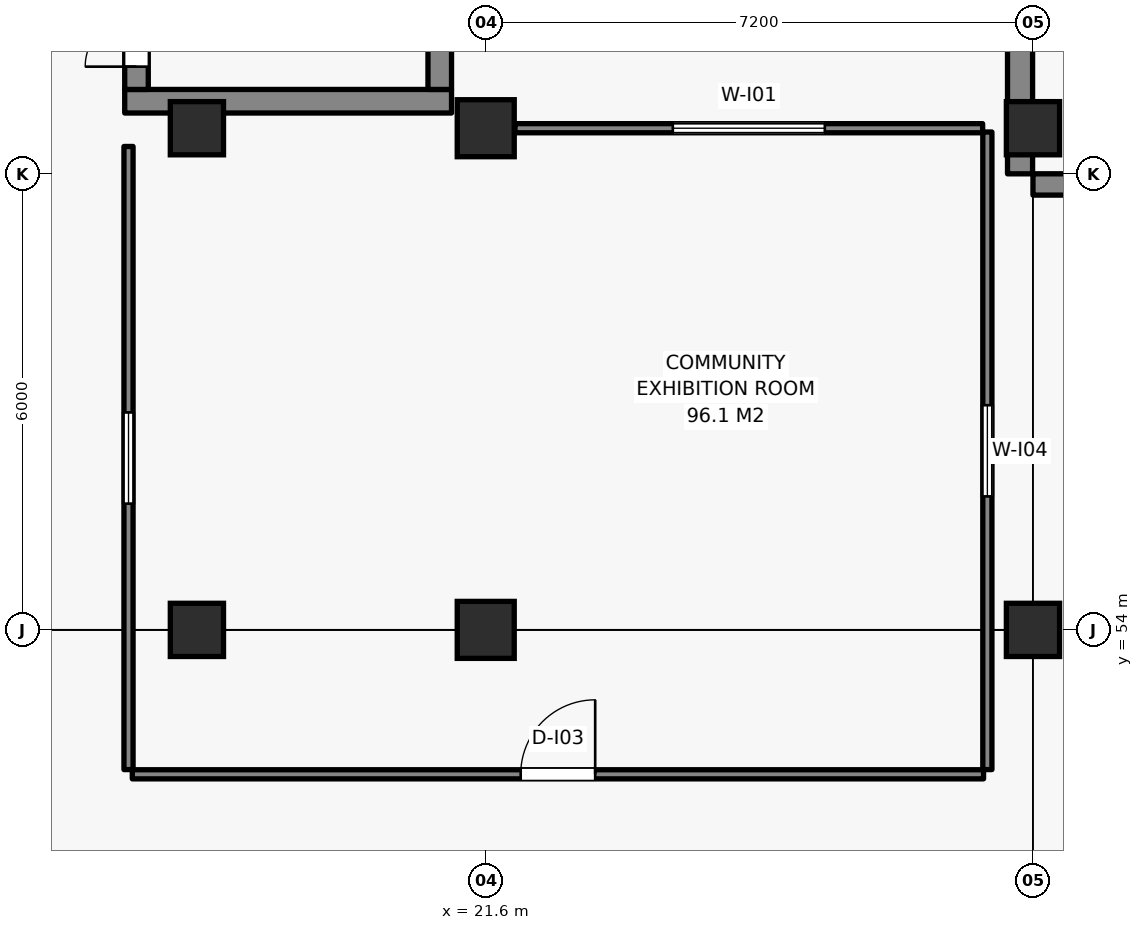
"""IFC4 building model, lengths in metres.
Left out: names, types, materials, properties, quantities, classifications, styles, units other than length and angle.
Written with IfcOpenShell. Run it as: python <this file> out.ifc"""

import sys

from ifc_helpers import new_model, si_unit, direction, frame, frame_2d, origin, origin_2d, place, context, subcontext, project, spatial, rectangle, extrude, element, fill, save


model = new_model("IFC4")
c1 = context("Model", 3, precision=1e-05, world=origin(), true_north=direction((0.0, 1.0)))
c2 = subcontext(c1, "Body", "Model", "MODEL_VIEW")
j1 = project(units=[si_unit("LENGTHUNIT", "METRE"), si_unit("PLANEANGLEUNIT", "RADIAN")], contexts=[c1])
p1 = place(None, origin())
s1 = spatial("IfcSite", under=j1, at=p1, CompositionType="ELEMENT")
p2 = place(p1, origin())
s2 = spatial("IfcBuilding", under=s1, at=p2, CompositionType="ELEMENT")
p3 = place(p2, origin())
s3 = spatial("IfcBuildingStorey", under=s2, at=p3, CompositionType="ELEMENT", Elevation=0.0)
p4 = place(p3, frame((16.85, 60.955, -0.4), z_axis=(0.0, 0.0, 1.0), x_axis=(1.0, 0.0, 0.0)))
e1 = element("IfcWall", 1, at=p4, inside=s3, PredefinedType="SHEAR", context=c2, shape_type="SweptSolid", body=[
    extrude(rectangle(XDim=4.3, YDim=0.31, at=frame_2d((2.15, 0.0))), origin(), (0.0, 0.0, 1.0), 6.15),
])
p5 = place(p3, frame((17.005, 61.11, -0.4), z_axis=(0.0, 0.0, 1.0), x_axis=(0.0, 1.0, 0.0)))
e2 = element("IfcWall", 2, at=p5, inside=s3, PredefinedType="SHEAR", context=c2, shape_type="SweptSolid", body=[
    extrude(rectangle(XDim=9.58, YDim=0.31, at=frame_2d((4.79, 0.0))), origin(), (0.0, 0.0, 1.0), 6.15),
])
p6 = place(p5, frame((0.3, 0.0, 0.4)))
e3 = element("IfcOpeningElement", 3, at=p6, cuts=e2, PredefinedType="OPENING", context=c2, shape_type="SweptSolid", body=[
    extrude(rectangle(XDim=1.35, YDim=2.15, at=frame_2d((0.675, 1.075))), frame((0.0, 0.165, 0.0), z_axis=(0.0, -1.0, 0.0), x_axis=(1.0, 0.0, 0.0)), (0.0, 0.0, 1.0), 0.33),
])
p7 = place(p3, frame((20.995, 61.11, -0.4), z_axis=(0.0, 0.0, 1.0), x_axis=(0.0, 1.0, 0.0)))
e4 = element("IfcWall", 4, at=p7, inside=s3, PredefinedType="SHEAR", context=c2, shape_type="SweptSolid", body=[
    extrude(rectangle(XDim=9.58, YDim=0.31, at=frame_2d((4.79, 0.0))), origin(), (0.0, 0.0, 1.0), 6.15),
])
for number, where, z_axis, x_axis in (
    (5, (17.8, 54.0, 0.0), (0.0, 0.0, 1.0), (1.0, 0.0, 0.0)),
    (6, (17.8, 60.6, 0.0), (0.0, 0.0, 1.0), (1.0, 0.0, 0.0)),
):
    element("IfcColumn", number, at=place(p3, frame(where, z_axis=z_axis, x_axis=x_axis)), inside=s3, PredefinedType="COLUMN", context=c2, shape_type="SweptSolid", body=[
        extrude(rectangle(XDim=0.7, YDim=0.7, at=origin_2d()), origin(), (0.0, 0.0, 1.0), 6.0),
    ])
for number, where, z_axis, x_axis in (
    (7, (21.6, 54.0, 0.0), (0.0, 0.0, 1.0), (1.0, 0.0, 0.0)),
    (8, (21.6, 60.6, 0.0), (0.0, 0.0, 1.0), (1.0, 0.0, 0.0)),
):
    element("IfcColumn", number, at=place(p3, frame(where, z_axis=z_axis, x_axis=x_axis)), inside=s3, PredefinedType="COLUMN", context=c2, shape_type="SweptSolid", body=[
        extrude(rectangle(XDim=0.75, YDim=0.75, at=origin_2d()), origin(), (0.0, 0.0, 1.0), 6.0),
    ])
for number, where, z_axis, x_axis in (
    (9, (28.8, 54.0, 0.0), (0.0, 0.0, 1.0), (1.0, 0.0, 0.0)),
    (10, (28.8, 60.6, 0.0), (0.0, 0.0, 1.0), (1.0, 0.0, 0.0)),
):
    element("IfcColumn", number, at=place(p3, frame(where, z_axis=z_axis, x_axis=x_axis)), inside=s3, PredefinedType="COLUMN", context=c2, shape_type="SweptSolid", body=[
        extrude(rectangle(XDim=0.7, YDim=0.7, at=origin_2d()), origin(), (0.0, 0.0, 1.0), 6.0),
    ])
p8 = place(p3, frame((28.63, 60.0, 0.0), z_axis=(0.0, 0.0, 1.0), x_axis=(0.0, 1.0, 0.0)))
e11 = element("IfcWall", 11, at=p8, inside=s3, PredefinedType="SOLIDWALL", context=c2, shape_type="SweptSolid", body=[
    extrude(rectangle(XDim=23.66, YDim=0.33, at=frame_2d((11.83, 0.0))), origin(), (0.0, 0.0, 1.0), 5.345),
])
p9 = place(p8, frame((7.518, 0.0, 0.0)))
e12 = element("IfcOpeningElement", 12, at=p9, cuts=e11, PredefinedType="OPENING", context=c2, shape_type="SweptSolid", body=[
    extrude(rectangle(XDim=2.0, YDim=2.4, at=frame_2d((1.0, 1.2))), frame((0.0, 0.175, 0.0), z_axis=(0.0, -1.0, 0.0), x_axis=(1.0, 0.0, 0.0)), (0.0, 0.0, 1.0), 0.35),
])
p10 = place(p8, frame((16.98, 0.0, 0.0)))
e13 = element("IfcOpeningElement", 13, at=p10, cuts=e11, PredefinedType="OPENING", context=c2, shape_type="SweptSolid", body=[
    extrude(rectangle(XDim=1.15, YDim=2.25, at=frame_2d((0.575, 1.125))), frame((0.0, 0.175, 0.0), z_axis=(0.0, -1.0, 0.0), x_axis=(1.0, 0.0, 0.0)), (0.0, 0.0, 1.0), 0.35),
])
p11 = place(p8, frame((20.788, 0.0, 0.82)))
e14 = element("IfcOpeningElement", 14, at=p11, cuts=e11, PredefinedType="OPENING", context=c2, shape_type="SweptSolid", body=[
    extrude(rectangle(XDim=1.8, YDim=2.35, at=frame_2d((0.9, 1.175))), frame((0.0, 0.175, 0.0), z_axis=(0.0, -1.0, 0.0), x_axis=(1.0, 0.0, 0.0)), (0.0, 0.0, 1.0), 0.35),
])
p12 = place(p3, frame((39.2, 59.86, 0.0), z_axis=(0.0, 0.0, 1.0), x_axis=(-1.0, 0.0, 0.0)))
e15 = element("IfcWall", 15, at=p12, inside=s3, PredefinedType="SOLIDWALL", context=c2, shape_type="SweptSolid", body=[
    extrude(rectangle(XDim=10.4, YDim=0.28, at=frame_2d((5.2, 0.0))), origin(), (0.0, 0.0, 1.0), 5.345),
])
p13 = place(p12, frame((6.925, 0.0, 0.85)))
e16 = element("IfcOpeningElement", 16, at=p13, cuts=e15, PredefinedType="OPENING", context=c2, shape_type="SweptSolid", body=[
    extrude(rectangle(XDim=1.75, YDim=2.15, at=frame_2d((0.875, 1.075))), frame((0.0, 0.15, 0.0), z_axis=(0.0, -1.0, 0.0), x_axis=(1.0, 0.0, 0.0)), (0.0, 0.0, 1.0), 0.3),
])
p14 = place(p3, frame((16.95, 52.1, 0.0), z_axis=(0.0, 0.0, 1.0), x_axis=(1.0, 0.0, 0.0)))
e17 = element("IfcWall", 17, at=p14, inside=s3, PredefinedType="PARTITIONING", context=c2, shape_type="SweptSolid", body=[
    extrude(rectangle(XDim=11.2, YDim=0.12, at=frame_2d((5.6, 0.0))), origin(), (0.0, 0.0, 1.0), 5.345),
])
p15 = place(p14, frame((5.11, 0.0, 0.0)))
e18 = element("IfcOpeningElement", 18, at=p15, cuts=e17, PredefinedType="OPENING", context=c2, shape_type="SweptSolid", body=[
    extrude(rectangle(XDim=0.98, YDim=2.15, at=frame_2d((0.49, 1.075))), frame((0.0, 0.07, 0.0), z_axis=(0.0, -1.0, 0.0), x_axis=(1.0, 0.0, 0.0)), (0.0, 0.0, 1.0), 0.14),
])
p16 = place(p3, frame((28.2, 52.162, 0.0), z_axis=(0.0, 0.0, 1.0), x_axis=(0.0, 1.0, 0.0)))
e19 = element("IfcWall", 19, at=p16, inside=s3, PredefinedType="PARTITIONING", context=c2, shape_type="SweptSolid", body=[
    extrude(rectangle(XDim=8.388, YDim=0.12, at=frame_2d((4.194, 0.0))), origin(), (0.0, 0.0, 1.0), 5.295),
])
p17 = place(p16, frame((3.594, 0.0, 1.05)))
e20 = element("IfcOpeningElement", 20, at=p17, cuts=e19, PredefinedType="OPENING", context=c2, shape_type="SweptSolid", body=[
    extrude(rectangle(XDim=1.2, YDim=1.1, at=frame_2d((0.6, 0.55))), frame((0.0, 0.07, 0.0), z_axis=(0.0, -1.0, 0.0), x_axis=(1.0, 0.0, 0.0)), (0.0, 0.0, 1.0), 0.14),
])
p18 = place(p3, frame((28.138, 60.6, 0.0), z_axis=(0.0, 0.0, 1.0), x_axis=(-1.0, 0.0, 0.0)))
e21 = element("IfcWall", 21, at=p18, inside=s3, PredefinedType="PARTITIONING", context=c2, shape_type="SweptSolid", body=[
    extrude(rectangle(XDim=6.153, YDim=0.12, at=frame_2d((3.076, 0.0))), origin(), (0.0, 0.0, 1.0), 5.295),
])
p19 = place(p18, frame((2.076, 0.0, 1.05)))
e22 = element("IfcOpeningElement", 22, at=p19, cuts=e21, PredefinedType="OPENING", context=c2, shape_type="SweptSolid", body=[
    extrude(rectangle(XDim=2.0, YDim=1.2, at=frame_2d((1.0, 0.6))), frame((0.0, 0.07, 0.0), z_axis=(0.0, -1.0, 0.0), x_axis=(1.0, 0.0, 0.0)), (0.0, 0.0, 1.0), 0.14),
])
p20 = place(p3, frame((16.9, 60.36, 0.0), z_axis=(0.0, 0.0, 1.0), x_axis=(0.0, -1.0, 0.0)))
e23 = element("IfcWall", 23, at=p20, inside=s3, PredefinedType="PARTITIONING", context=c2, shape_type="SweptSolid", body=[
    extrude(rectangle(XDim=8.198, YDim=0.12, at=frame_2d((4.099, 0.0))), origin(), (0.0, 0.0, 1.0), 5.72),
])
p21 = place(p20, frame((3.499, 0.0, 1.05)))
e24 = element("IfcOpeningElement", 24, at=p21, cuts=e23, PredefinedType="OPENING", context=c2, shape_type="SweptSolid", body=[
    extrude(rectangle(XDim=1.2, YDim=1.1, at=frame_2d((0.6, 0.55))), frame((0.0, 0.07, 0.0), z_axis=(0.0, -1.0, 0.0), x_axis=(1.0, 0.0, 0.0)), (0.0, 0.0, 1.0), 0.14),
])
p22 = place(p6, origin())
e25 = element("IfcDoor", 25, at=p22, inside=s3, OperationType="DOUBLE_DOOR_SINGLE_SWING", PredefinedType="DOOR", context=c2, shape_type="SweptSolid", body=[
    extrude(rectangle(XDim=1.35, YDim=2.15, at=frame_2d((0.675, 1.075))), frame((0.0, 0.025, 0.0), z_axis=(0.0, -1.0, 0.0), x_axis=(1.0, 0.0, 0.0)), (0.0, 0.0, 1.0), 0.05),
])
fill(e3, e25)
p23 = place(p15, origin())
e26 = element("IfcDoor", 26, at=p23, inside=s3, OperationType="SINGLE_SWING_RIGHT", PredefinedType="DOOR", context=c2, shape_type="SweptSolid", body=[
    extrude(rectangle(XDim=0.98, YDim=2.15, at=frame_2d((0.49, 1.075))), frame((0.0, 0.025, 0.0), z_axis=(0.0, -1.0, 0.0), x_axis=(1.0, 0.0, 0.0)), (0.0, 0.0, 1.0), 0.05),
])
fill(e18, e26)
p24 = place(p17, origin())
e27 = element("IfcWindow", 27, at=p24, inside=s3, PartitioningType="SINGLE_PANEL", PredefinedType="WINDOW", context=c2, shape_type="SweptSolid", body=[
    extrude(rectangle(XDim=1.2, YDim=1.1, at=frame_2d((0.6, 0.55))), frame((0.0, 0.03, 0.0), z_axis=(0.0, -1.0, 0.0), x_axis=(1.0, 0.0, 0.0)), (0.0, 0.0, 1.0), 0.06),
])
fill(e20, e27)
p25 = place(p19, origin())
e28 = element("IfcWindow", 28, at=p25, inside=s3, PartitioningType="SINGLE_PANEL", PredefinedType="WINDOW", context=c2, shape_type="SweptSolid", body=[
    extrude(rectangle(XDim=2.0, YDim=1.2, at=frame_2d((1.0, 0.6))), frame((0.0, 0.03, 0.0), z_axis=(0.0, -1.0, 0.0), x_axis=(1.0, 0.0, 0.0)), (0.0, 0.0, 1.0), 0.06),
])
fill(e22, e28)
p26 = place(p21, origin())
e29 = element("IfcWindow", 29, at=p26, inside=s3, PartitioningType="SINGLE_PANEL", PredefinedType="WINDOW", context=c2, shape_type="SweptSolid", body=[
    extrude(rectangle(XDim=1.2, YDim=1.1, at=frame_2d((0.6, 0.55))), frame((0.0, 0.03, 0.0), z_axis=(0.0, -1.0, 0.0), x_axis=(1.0, 0.0, 0.0)), (0.0, 0.0, 1.0), 0.06),
])
fill(e24, e29)
save(model, sys.argv[1])
